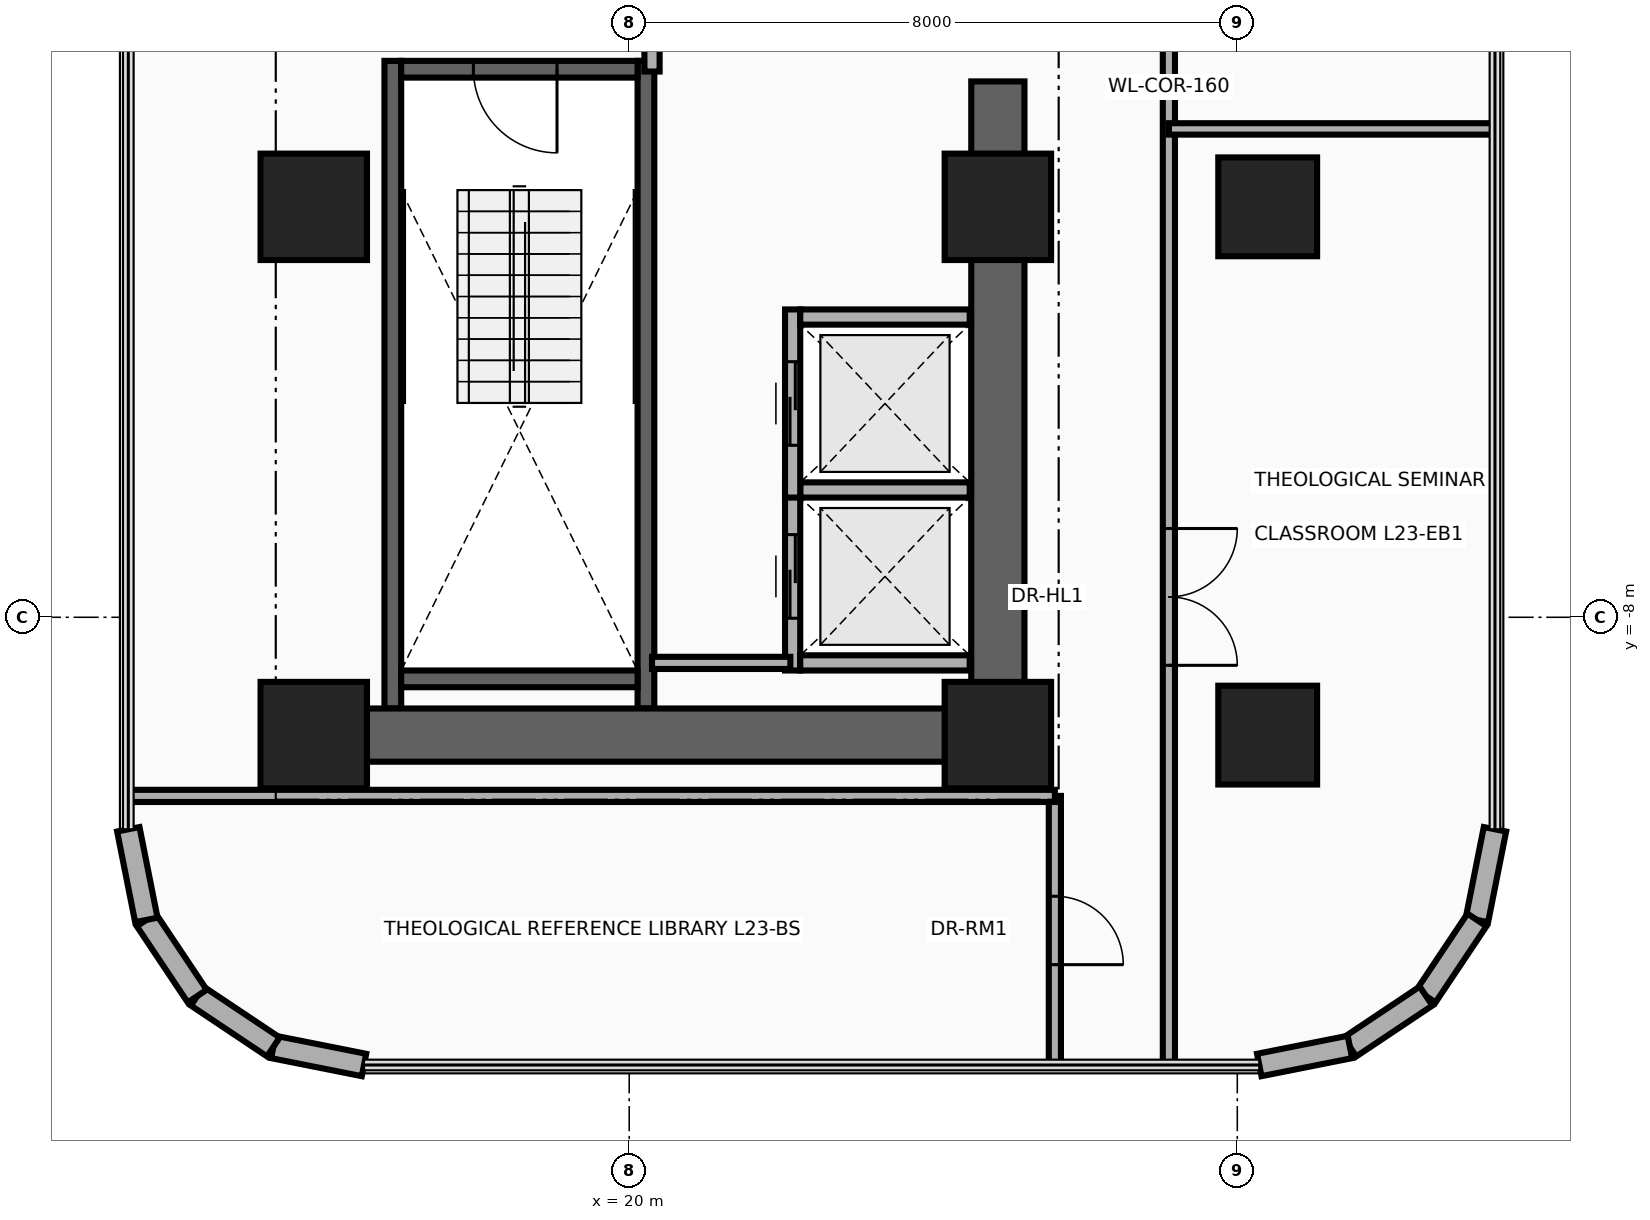
"""IFC4 building model, lengths in metres.
Left out: names, types, materials, properties, quantities, classifications, styles, units other than length and angle.
Written with IfcOpenShell. Run it as: python <this file> out.ifc"""

import sys

from ifc_helpers import new_model, si_unit, direction, frame, frame_2d, origin, origin_2d, place, context, subcontext, project, spatial, rectangle, circle, extrude, source, transform, mapped, element, fill, save


model = new_model("IFC4")
c1 = context("Model", 3, precision=1e-05, world=origin(), true_north=direction((0.0, 1.0)))
c2 = subcontext(c1, "Body", "Model", "MODEL_VIEW")
j1 = project(units=[si_unit("LENGTHUNIT", "METRE"), si_unit("PLANEANGLEUNIT", "RADIAN")], contexts=[c1])
p1 = place(None, origin())
s1 = spatial("IfcSite", under=j1, at=p1, CompositionType="ELEMENT")
p2 = place(p1, origin())
s2 = spatial("IfcBuilding", under=s1, at=p2, CompositionType="ELEMENT")
p3 = place(p2, frame((0.0, 0.0, 92.6)))
s3 = spatial("IfcBuildingStorey", under=s2, at=p3, CompositionType="ELEMENT", Elevation=92.6)
for number, where, z_axis, x_axis in (
    (1, (16.89, -9.2, 0.0), (0.0, 0.0, 1.0), (0.0, 1.0, 0.0)),
    (2, (20.22, -9.2, 0.0), (0.0, 0.0, 1.0), (0.0, 1.0, 0.0)),
):
    element("IfcWall", number, at=place(p3, frame(where, z_axis=z_axis, x_axis=x_axis)), inside=s3, PredefinedType="SHEAR", context=c2, shape_type="SweptSolid", body=[
        extrude(rectangle(XDim=8.52, YDim=0.22, at=frame_2d((4.26, 0.0))), origin(), (0.0, 0.0, 1.0), 3.46),
    ])
p4 = place(p3, frame((17.0, -8.81, 0.0), z_axis=(0.0, 0.0, 1.0), x_axis=(1.0, 0.0, 0.0)))
e3 = element("IfcWall", 3, at=p4, inside=s3, PredefinedType="SHEAR", context=c2, shape_type="SweptSolid", body=[
    extrude(rectangle(XDim=3.11, YDim=0.22, at=frame_2d((1.555, 0.0))), origin(), (0.0, 0.0, 1.0), 3.46),
])
p5 = place(p3, frame((17.0, -0.79, 0.0), z_axis=(0.0, 0.0, 1.0), x_axis=(1.0, 0.0, 0.0)))
e4 = element("IfcWall", 4, at=p5, inside=s3, PredefinedType="SHEAR", context=c2, shape_type="SweptSolid", body=[
    extrude(rectangle(XDim=3.11, YDim=0.22, at=frame_2d((1.555, 0.0))), origin(), (0.0, 0.0, 1.0), 3.46),
])
p6 = place(p5, frame((0.95, 0.0, 0.0)))
e5 = element("IfcOpeningElement", 5, at=p6, cuts=e4, PredefinedType="OPENING", context=c2, shape_type="SweptSolid", body=[
    extrude(rectangle(XDim=1.1, YDim=2.15, at=frame_2d((0.55, 1.075))), frame((0.0, 0.125, 0.0), z_axis=(0.0, -1.0, 0.0), x_axis=(1.0, 0.0, 0.0)), (0.0, 0.0, 1.0), 0.25),
])
p7 = place(p3, frame((24.85, -9.9, 0.0), z_axis=(0.0, 0.0, 1.0), x_axis=(0.0, 1.0, 0.0)))
e6 = element("IfcWall", 6, at=p7, inside=s3, PredefinedType="SHEAR", context=c2, shape_type="SweptSolid", body=[
    extrude(rectangle(XDim=8.95, YDim=0.7, at=frame_2d((4.475, 0.0))), origin(), (0.0, 0.0, 1.0), 3.46),
])
p8 = place(p3, frame((15.85, -9.55, 0.0), z_axis=(0.0, 0.0, 1.0), x_axis=(1.0, 0.0, 0.0)))
e7 = element("IfcWall", 7, at=p8, inside=s3, PredefinedType="SHEAR", context=c2, shape_type="SweptSolid", body=[
    extrude(rectangle(XDim=9.0, YDim=0.7, at=frame_2d((4.5, 0.0))), origin(), (0.0, 0.0, 1.0), 3.46),
])
m1 = source(origin(), c2, "Body", "SweptSolid", [
    extrude(rectangle(XDim=1.4, YDim=1.4, at=origin_2d()), origin(), (0.0, 0.0, 1.0), 3.7),
])
for number, where, z_axis, x_axis in (
    (8, (15.85, -9.55, 0.0), (0.0, 0.0, 1.0), (1.0, 0.0, 0.0)),
    (9, (24.85, -9.55, 0.0), (0.0, 0.0, 1.0), (1.0, 0.0, 0.0)),
):
    element("IfcColumn", number, at=place(p3, frame(where, z_axis=z_axis, x_axis=x_axis)), inside=s3, PredefinedType="COLUMN", context=c2, shape_type="MappedRepresentation", body=[
        mapped(m1, transform((0.0, 0.0, 0.0), x_axis=(1.0, 0.0, 0.0), y_axis=(0.0, 1.0, 0.0), z_axis=(0.0, 0.0, 1.0), scale=1.0)),
    ])
m2 = source(origin(), c2, "Body", "SweptSolid", [
    extrude(circle(Radius=0.65, at=origin_2d()), origin(), (0.0, 0.0, 1.0), 3.7),
])
p9 = place(p3, frame((28.4, -9.55, 0.0), z_axis=(0.0, 0.0, 1.0), x_axis=(1.0, 0.0, 0.0)))
e10 = element("IfcColumn", 10, at=p9, inside=s3, PredefinedType="COLUMN", context=c2, shape_type="MappedRepresentation", body=[
    mapped(m2, transform((0.0, 0.0, 0.0), x_axis=(1.0, 0.0, 0.0), y_axis=(0.0, 1.0, 0.0), z_axis=(0.0, 0.0, 1.0), scale=1.0)),
])
for number, where, z_axis, x_axis in (
    (11, (15.85, -2.6, 0.0), (0.0, 0.0, 1.0), (1.0, 0.0, 0.0)),
    (12, (24.85, -2.6, 0.0), (0.0, 0.0, 1.0), (1.0, 0.0, 0.0)),
):
    element("IfcColumn", number, at=place(p3, frame(where, z_axis=z_axis, x_axis=x_axis)), inside=s3, PredefinedType="COLUMN", context=c2, shape_type="MappedRepresentation", body=[
        mapped(m1, transform((0.0, 0.0, 0.0), x_axis=(1.0, 0.0, 0.0), y_axis=(0.0, 1.0, 0.0), z_axis=(0.0, 0.0, 1.0), scale=1.0)),
    ])
p10 = place(p3, frame((28.4, -2.6, 0.0), z_axis=(0.0, 0.0, 1.0), x_axis=(1.0, 0.0, 0.0)))
e13 = element("IfcColumn", 13, at=p10, inside=s3, PredefinedType="COLUMN", context=c2, shape_type="MappedRepresentation", body=[
    mapped(m2, transform((0.0, 0.0, 0.0), x_axis=(1.0, 0.0, 0.0), y_axis=(0.0, 1.0, 0.0), z_axis=(0.0, 0.0, 1.0), scale=1.0)),
])
p11 = place(p3, frame((31.39, -10.789, 0.0), z_axis=(0.0, 0.0, 1.0), x_axis=(-0.194996050505, -0.980804027463, 0.0)))
e14 = element("IfcWall", 14, at=p11, inside=s3, PredefinedType="SOLIDWALL", context=c2, shape_type="SweptSolid", body=[
    extrude(rectangle(XDim=1.216, YDim=0.3, at=frame_2d((0.608, 0.0))), origin(), (0.0, 0.0, 1.0), 3.46),
])
for number, where, z_axis, x_axis in (
    (15, (31.153, -11.982, 0.0), (0.0, 0.0, 1.0), (-0.556, -0.831, 0.0)),
    (16, (30.483, -12.983, 0.0), (0.0, 0.0, 1.0), (-0.831, -0.556, 0.0)),
):
    element("IfcWall", number, at=place(p3, frame(where, z_axis=z_axis, x_axis=x_axis)), inside=s3, PredefinedType="SOLIDWALL", context=c2, shape_type="SweptSolid", body=[
        extrude(rectangle(XDim=1.205, YDim=0.3, at=frame_2d((0.603, 0.0))), origin(), (0.0, 0.0, 1.0), 3.46),
    ])
for number, where, z_axis, x_axis in (
    (17, (29.482, -13.653, 0.0), (0.0, 0.0, 1.0), (-0.981, -0.195, 0.0)),
    (18, (16.511, -13.89, 0.0), (0.0, 0.0, 1.0), (-0.981, 0.195, 0.0)),
):
    element("IfcWall", number, at=place(p3, frame(where, z_axis=z_axis, x_axis=x_axis)), inside=s3, PredefinedType="SOLIDWALL", context=c2, shape_type="SweptSolid", body=[
        extrude(rectangle(XDim=1.216, YDim=0.3, at=frame_2d((0.608, 0.0))), origin(), (0.0, 0.0, 1.0), 3.46),
    ])
for number, where, z_axis, x_axis in (
    (19, (15.318, -13.653, 0.0), (0.0, 0.0, 1.0), (-0.831, 0.556, 0.0)),
    (20, (14.317, -12.983, 0.0), (0.0, 0.0, 1.0), (-0.556, 0.831, 0.0)),
):
    element("IfcWall", number, at=place(p3, frame(where, z_axis=z_axis, x_axis=x_axis)), inside=s3, PredefinedType="SOLIDWALL", context=c2, shape_type="SweptSolid", body=[
        extrude(rectangle(XDim=1.205, YDim=0.3, at=frame_2d((0.603, 0.0))), origin(), (0.0, 0.0, 1.0), 3.46),
    ])
p12 = place(p3, frame((13.647, -11.982, 0.0), z_axis=(0.0, 0.0, 1.0), x_axis=(-0.195189223115, 0.980765602568, 0.0)))
e21 = element("IfcWall", 21, at=p12, inside=s3, PredefinedType="SOLIDWALL", context=c2, shape_type="SweptSolid", body=[
    extrude(rectangle(XDim=1.216, YDim=0.3, at=frame_2d((0.608, 0.0))), origin(), (0.0, 0.0, 1.0), 3.46),
])
p13 = place(p3, frame((22.15, -8.7, 0.0), z_axis=(0.0, 0.0, 1.0), x_axis=(0.0, 1.0, 0.0)))
e22 = element("IfcWall", 22, at=p13, inside=s3, PredefinedType="MOVABLE", context=c2, shape_type="SweptSolid", body=[
    extrude(rectangle(XDim=2.475, YDim=0.2, at=frame_2d((1.237, 0.0))), origin(), (0.0, 0.0, 1.0), 3.46),
])
p14 = place(p13, frame((0.688, 0.0, 0.0)))
e23 = element("IfcOpeningElement", 23, at=p14, cuts=e22, PredefinedType="OPENING", context=c2, shape_type="SweptSolid", body=[
    extrude(rectangle(XDim=1.1, YDim=2.1, at=frame_2d((0.55, 1.05))), frame((0.0, 0.115, 0.0), z_axis=(0.0, -1.0, 0.0), x_axis=(1.0, 0.0, 0.0)), (0.0, 0.0, 1.0), 0.23),
])
for number, where, z_axis, x_axis in (
    (24, (22.25, -8.6, 0.0), (0.0, 0.0, 1.0), (1.0, 0.0, 0.0)),
    (25, (22.25, -6.325, 0.0), (0.0, 0.0, 1.0), (1.0, 0.0, 0.0)),
):
    element("IfcWall", number, at=place(p3, frame(where, z_axis=z_axis, x_axis=x_axis)), inside=s3, PredefinedType="MOVABLE", context=c2, shape_type="SweptSolid", body=[
        extrude(rectangle(XDim=2.23, YDim=0.2, at=frame_2d((1.115, 0.0))), origin(), (0.0, 0.0, 1.0), 3.46),
    ])
p15 = place(p3, frame((22.15, -6.425, 0.0), z_axis=(0.0, 0.0, 1.0), x_axis=(0.0, 1.0, 0.0)))
e26 = element("IfcWall", 26, at=p15, inside=s3, PredefinedType="MOVABLE", context=c2, shape_type="SweptSolid", body=[
    extrude(rectangle(XDim=2.475, YDim=0.2, at=frame_2d((1.238, 0.0))), origin(), (0.0, 0.0, 1.0), 3.46),
])
p16 = place(p15, frame((0.688, 0.0, 0.0)))
e27 = element("IfcOpeningElement", 27, at=p16, cuts=e26, PredefinedType="OPENING", context=c2, shape_type="SweptSolid", body=[
    extrude(rectangle(XDim=1.1, YDim=2.1, at=frame_2d((0.55, 1.05))), frame((0.0, 0.115, 0.0), z_axis=(0.0, -1.0, 0.0), x_axis=(1.0, 0.0, 0.0)), (0.0, 0.0, 1.0), 0.23),
])
p17 = place(p3, frame((22.25, -4.05, 0.0), z_axis=(0.0, 0.0, 1.0), x_axis=(1.0, 0.0, 0.0)))
e28 = element("IfcWall", 28, at=p17, inside=s3, PredefinedType="MOVABLE", context=c2, shape_type="SweptSolid", body=[
    extrude(rectangle(XDim=2.23, YDim=0.2, at=frame_2d((1.115, 0.0))), origin(), (0.0, 0.0, 1.0), 3.46),
])
p18 = place(p3, frame((20.3, -0.82, 0.0), z_axis=(0.0, 0.0, 1.0), x_axis=(0.0, 1.0, 0.0)))
e29 = element("IfcWall", 29, at=p18, inside=s3, PredefinedType="PARTITIONING", context=c2, shape_type="SweptSolid", body=[
    extrude(rectangle(XDim=1.64, YDim=0.2, at=frame_2d((0.82, 0.0))), origin(), (0.0, 0.0, 1.0), 3.46),
])
p19 = place(p18, frame((0.295, 0.0, 0.0)))
e30 = element("IfcOpeningElement", 30, at=p19, cuts=e29, PredefinedType="OPENING", context=c2, shape_type="SweptSolid", body=[
    extrude(rectangle(XDim=1.05, YDim=2.15, at=frame_2d((0.525, 1.075))), frame((0.0, 0.115, 0.0), z_axis=(0.0, -1.0, 0.0), x_axis=(1.0, 0.0, 0.0)), (0.0, 0.0, 1.0), 0.23),
])
p20 = place(p3, frame((20.3, -8.6, 0.0), z_axis=(0.0, 0.0, 1.0), x_axis=(1.0, 0.0, 0.0)))
e31 = element("IfcWall", 31, at=p20, inside=s3, PredefinedType="PARTITIONING", context=c2, shape_type="SweptSolid", body=[
    extrude(rectangle(XDim=1.82, YDim=0.16, at=frame_2d((0.91, 0.0))), origin(), (0.0, 0.0, 1.0), 3.46),
])
p21 = place(p3, frame((25.6, -13.89, 0.0), z_axis=(0.0, 0.0, 1.0), x_axis=(0.0, 1.0, 0.0)))
e32 = element("IfcWall", 32, at=p21, inside=s3, PredefinedType="PARTITIONING", context=c2, shape_type="SweptSolid", body=[
    extrude(rectangle(XDim=3.54, YDim=0.16, at=frame_2d((1.77, 0.0))), origin(), (0.0, 0.0, 1.0), 3.46),
])
p22 = place(p21, frame((1.32, 0.0, 0.0)))
e33 = element("IfcOpeningElement", 33, at=p22, cuts=e32, PredefinedType="OPENING", context=c2, shape_type="SweptSolid", body=[
    extrude(rectangle(XDim=0.9, YDim=2.1, at=frame_2d((0.45, 1.05))), frame((0.0, 0.095, 0.0), z_axis=(0.0, -1.0, 0.0), x_axis=(1.0, 0.0, 0.0)), (0.0, 0.0, 1.0), 0.19),
])
p23 = place(p3, frame((13.41, -10.35, 0.0), z_axis=(0.0, 0.0, 1.0), x_axis=(1.0, 0.0, 0.0)))
e34 = element("IfcWall", 34, at=p23, inside=s3, PredefinedType="PARTITIONING", context=c2, shape_type="SweptSolid", body=[
    extrude(rectangle(XDim=12.19, YDim=0.16, at=frame_2d((6.095, 0.0))), origin(), (0.0, 0.0, 1.0), 3.46),
])
p24 = place(p3, frame((27.1, -13.89, 0.0), z_axis=(0.0, 0.0, 1.0), x_axis=(0.0, 1.0, 0.0)))
e35 = element("IfcWall", 35, at=p24, inside=s3, PredefinedType="PARTITIONING", context=c2, shape_type="SweptSolid", body=[
    extrude(rectangle(XDim=25.74, YDim=0.16, at=frame_2d((12.87, 0.0))), origin(), (0.0, 0.0, 1.0), 2.583),
])
p25 = place(p24, frame((5.258, 0.0, 0.0)))
e36 = element("IfcOpeningElement", 36, at=p25, cuts=e35, PredefinedType="OPENING", context=c2, shape_type="SweptSolid", body=[
    extrude(rectangle(XDim=1.8, YDim=2.15, at=frame_2d((0.9, 1.075))), frame((0.0, 0.095, 0.0), z_axis=(0.0, -1.0, 0.0), x_axis=(1.0, 0.0, 0.0)), (0.0, 0.0, 1.0), 0.19),
])
p26 = place(p24, frame((18.128, 0.0, 0.0)))
e37 = element("IfcOpeningElement", 37, at=p26, cuts=e35, PredefinedType="OPENING", context=c2, shape_type="SweptSolid", body=[
    extrude(rectangle(XDim=1.8, YDim=2.15, at=frame_2d((0.9, 1.075))), frame((0.0, 0.095, 0.0), z_axis=(0.0, -1.0, 0.0), x_axis=(1.0, 0.0, 0.0)), (0.0, 0.0, 1.0), 0.19),
])
p27 = place(p3, frame((27.1, -1.575, 0.0), z_axis=(0.0, 0.0, 1.0), x_axis=(1.0, 0.0, 0.0)))
e38 = element("IfcWall", 38, at=p27, inside=s3, PredefinedType="PARTITIONING", context=c2, shape_type="SweptSolid", body=[
    extrude(rectangle(XDim=4.29, YDim=0.15, at=frame_2d((2.145, 0.0))), origin(), (0.0, 0.0, 1.0), 2.896),
])
p28 = place(p14, origin())
e39 = element("IfcDoor", 39, at=p28, inside=s3, OperationType="DOUBLE_DOOR_SLIDING", PredefinedType="DOOR", context=c2, shape_type="SweptSolid", body=[
    extrude(rectangle(XDim=1.1, YDim=2.1, at=frame_2d((0.55, 1.05))), frame((0.0, 0.025, 0.0), z_axis=(0.0, -1.0, 0.0), x_axis=(1.0, 0.0, 0.0)), (0.0, 0.0, 1.0), 0.05),
])
fill(e23, e39)
p29 = place(p16, origin())
e40 = element("IfcDoor", 40, at=p29, inside=s3, OperationType="DOUBLE_DOOR_SLIDING", PredefinedType="DOOR", context=c2, shape_type="SweptSolid", body=[
    extrude(rectangle(XDim=1.1, YDim=2.1, at=frame_2d((0.55, 1.05))), frame((0.0, 0.025, 0.0), z_axis=(0.0, -1.0, 0.0), x_axis=(1.0, 0.0, 0.0)), (0.0, 0.0, 1.0), 0.05),
])
fill(e27, e40)
p30 = place(p6, frame((1.1, 0.0, 0.0), z_axis=(0.0, 0.0, 1.0), x_axis=(-1.0, 0.0, 0.0)))
e41 = element("IfcDoor", 41, at=p30, inside=s3, OperationType="SINGLE_SWING_LEFT", PredefinedType="DOOR", context=c2, shape_type="SweptSolid", body=[
    extrude(rectangle(XDim=1.1, YDim=2.15, at=frame_2d((0.55, 1.075))), frame((0.0, 0.025, 0.0), z_axis=(0.0, -1.0, 0.0), x_axis=(1.0, 0.0, 0.0)), (0.0, 0.0, 1.0), 0.05),
])
fill(e5, e41)
p31 = place(p22, frame((0.9, 0.0, 0.0), z_axis=(0.0, 0.0, 1.0), x_axis=(-1.0, 0.0, 0.0)))
e42 = element("IfcDoor", 42, at=p31, inside=s3, OperationType="SINGLE_SWING_LEFT", PredefinedType="DOOR", context=c2, shape_type="SweptSolid", body=[
    extrude(rectangle(XDim=0.9, YDim=2.1, at=frame_2d((0.45, 1.05))), frame((0.0, 0.025, 0.0), z_axis=(0.0, -1.0, 0.0), x_axis=(1.0, 0.0, 0.0)), (0.0, 0.0, 1.0), 0.05),
])
fill(e33, e42)
p32 = place(p25, frame((1.8, 0.0, 0.0), z_axis=(0.0, 0.0, 1.0), x_axis=(-1.0, 0.0, 0.0)))
e43 = element("IfcDoor", 43, at=p32, inside=s3, OperationType="DOUBLE_DOOR_SINGLE_SWING", PredefinedType="DOOR", context=c2, shape_type="SweptSolid", body=[
    extrude(rectangle(XDim=1.8, YDim=2.15, at=frame_2d((0.9, 1.075))), frame((0.0, 0.025, 0.0), z_axis=(0.0, -1.0, 0.0), x_axis=(1.0, 0.0, 0.0)), (0.0, 0.0, 1.0), 0.05),
])
fill(e36, e43)
save(model, sys.argv[1])
